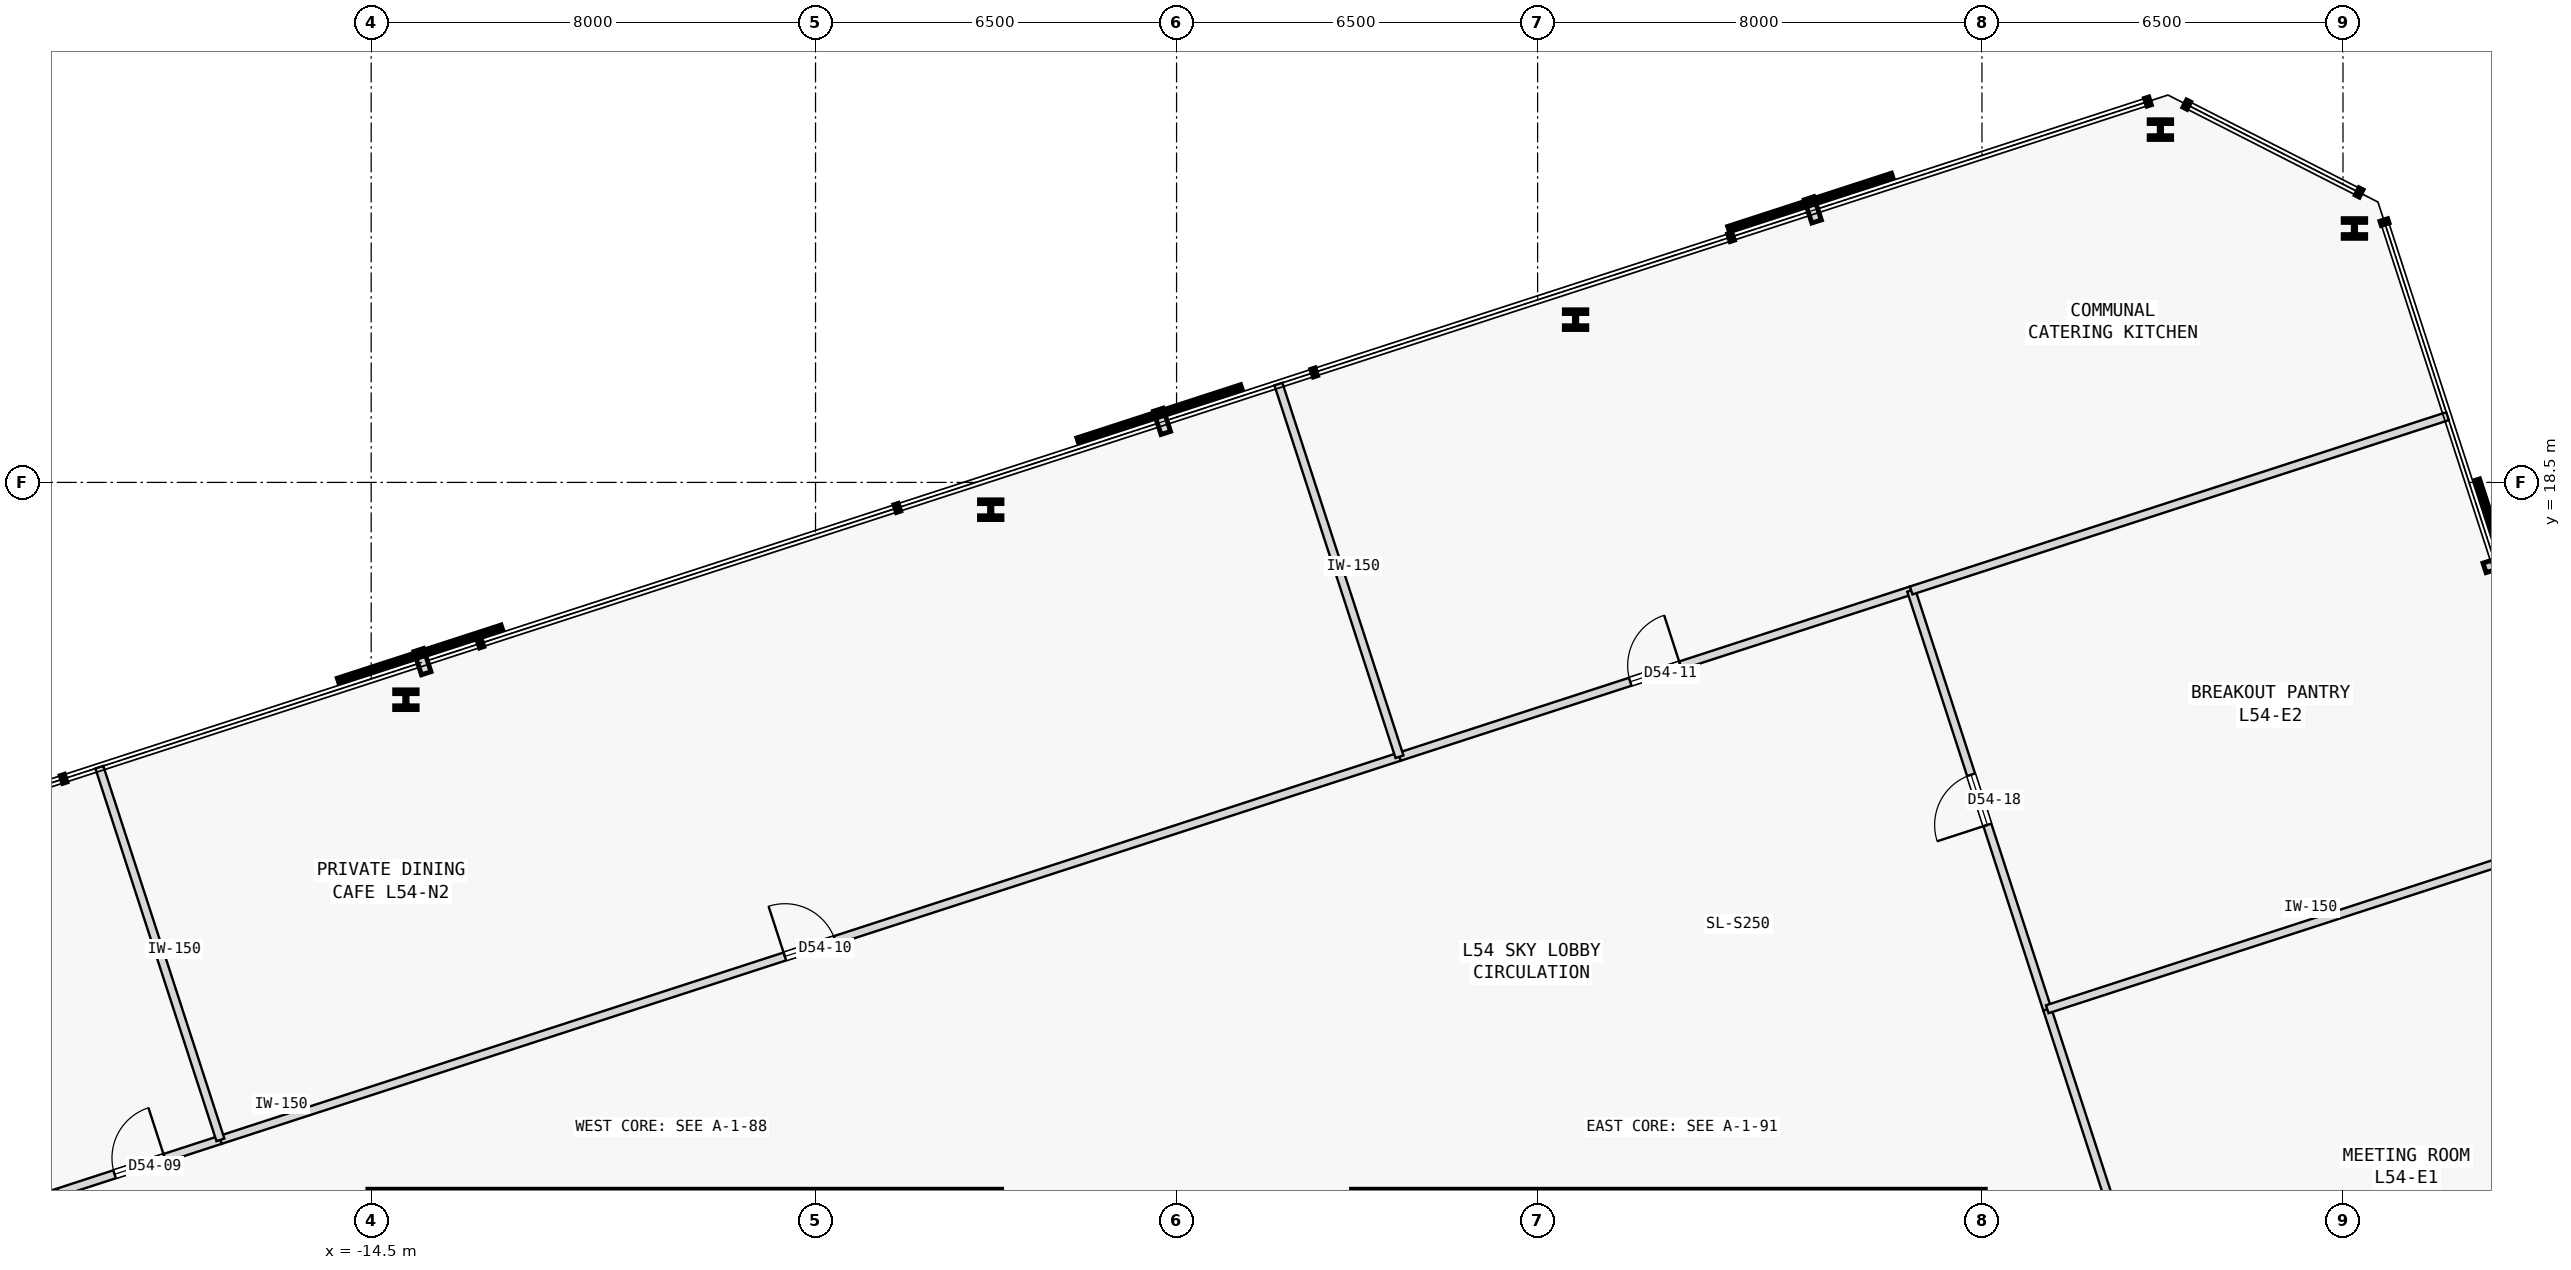
"""IFC4 building model, lengths in metres.
Left out: names, types, materials, properties, quantities, classifications, styles, units other than length and angle.
Written with IfcOpenShell. Run it as: python <this file> out.ifc"""

import sys

from ifc_helpers import new_model, si_unit, direction, frame, frame_2d, origin, origin_2d, place, context, subcontext, project, spatial, rectangle, i_section, extrude, element, fill, save


model = new_model("IFC4")
c1 = context("Model", 3, precision=1e-05, world=origin(), true_north=direction((0.0, 1.0)))
c2 = subcontext(c1, "Body", "Model", "MODEL_VIEW")
j1 = project(units=[si_unit("LENGTHUNIT", "METRE"), si_unit("PLANEANGLEUNIT", "RADIAN")], contexts=[c1])
p1 = place(None, origin())
s1 = spatial("IfcSite", under=j1, at=p1, CompositionType="ELEMENT")
p2 = place(p1, origin())
s2 = spatial("IfcBuilding", under=s1, at=p2, CompositionType="ELEMENT")
p3 = place(p2, frame((0.0, 0.0, 206.8)))
s3 = spatial("IfcBuildingStorey", under=s2, at=p3, CompositionType="ELEMENT", Elevation=206.8)
for number, where, z_axis, x_axis in (
    (1, (-14.56, 5.6, 0.0), (0.0, 0.0, 1.0), (1.0, 0.0, 0.0)),
    (2, (3.15, 5.6, 0.0), (0.0, 0.0, 1.0), (1.0, 0.0, 0.0)),
):
    element("IfcWall", number, at=place(p3, frame(where, z_axis=z_axis, x_axis=x_axis)), inside=s3, PredefinedType="SHEAR", context=c2, shape_type="SweptSolid", body=[
        extrude(rectangle(XDim=11.41, YDim=0.35, at=frame_2d((5.705, 0.0))), origin(), (0.0, 0.0, 1.0), 3.875),
    ])
for number, where, z_axis, x_axis in (
    (3, (21.206, 23.071, 0.0), (0.0, 0.0, 1.0), (1.0, 0.0, 0.0)),
    (4, (17.713, 24.851, 0.0), (0.0, 0.0, 1.0), (1.0, 0.0, 0.0)),
    (5, (7.184, 21.43, 0.0), (0.0, 0.0, 1.0), (1.0, 0.0, 0.0)),
    (6, (-3.346, 18.009, 0.0), (0.0, 0.0, 1.0), (1.0, 0.0, 0.0)),
    (7, (-13.875, 14.587, 0.0), (0.0, 0.0, 1.0), (1.0, 0.0, 0.0)),
):
    element("IfcColumn", number, at=place(p3, frame(where, z_axis=z_axis, x_axis=x_axis)), inside=s3, PredefinedType="COLUMN", context=c2, shape_type="SweptSolid", body=[
        extrude(i_section(OverallWidth=0.405, OverallDepth=0.355, WebThickness=0.042, FlangeThickness=0.068, FilletRadius=0.015, at=origin_2d()), origin(), (0.0, 0.0, 1.0), 4.1),
    ])
p4 = place(p3, frame((-20.123, 5.719, 0.0), z_axis=(0.0, 0.0, 1.0), x_axis=(0.95105108089, 0.309033722331, 0.0)))
e8 = element("IfcWall", 8, at=p4, inside=s3, PredefinedType="PARTITIONING", context=c2, shape_type="SweptSolid", body=[
    extrude(rectangle(XDim=3.058, YDim=0.15, at=frame_2d((1.529, 0.0))), origin(), (0.0, 0.0, 1.0), 3.875),
])
p5 = place(p4, frame((1.054, 0.0, 0.0)))
e9 = element("IfcOpeningElement", 9, at=p5, cuts=e8, PredefinedType="OPENING", context=c2, shape_type="SweptSolid", body=[
    extrude(rectangle(XDim=0.95, YDim=2.15, at=frame_2d((0.475, 1.075))), frame((0.0, 0.085, 0.0), z_axis=(0.0, -1.0, 0.0), x_axis=(1.0, 0.0, 0.0)), (0.0, 0.0, 1.0), 0.17),
])
p6 = place(p3, frame((-17.214, 6.664, 0.0), z_axis=(0.0, 0.0, 1.0), x_axis=(0.951056894815, 0.309015829409, 0.0)))
e10 = element("IfcWall", 10, at=p6, inside=s3, PredefinedType="PARTITIONING", context=c2, shape_type="SweptSolid", body=[
    extrude(rectangle(XDim=22.32, YDim=0.15, at=frame_2d((11.16, 0.0))), origin(), (0.0, 0.0, 1.0), 3.875),
])
p7 = place(p6, frame((10.685, 0.0, 0.0)))
e11 = element("IfcOpeningElement", 11, at=p7, cuts=e10, PredefinedType="OPENING", context=c2, shape_type="SweptSolid", body=[
    extrude(rectangle(XDim=0.95, YDim=2.15, at=frame_2d((0.475, 1.075))), frame((0.0, 0.085, 0.0), z_axis=(0.0, -1.0, 0.0), x_axis=(1.0, 0.0, 0.0)), (0.0, 0.0, 1.0), 0.17),
])
p8 = place(p3, frame((4.013, 13.561, 0.0), z_axis=(0.0, 0.0, 1.0), x_axis=(0.951057772929, 0.309013126826, 0.0)))
e12 = element("IfcWall", 12, at=p8, inside=s3, PredefinedType="PARTITIONING", context=c2, shape_type="SweptSolid", body=[
    extrude(rectangle(XDim=9.687, YDim=0.15, at=frame_2d((4.844, 0.0))), origin(), (0.0, 0.0, 1.0), 3.875),
])
p9 = place(p8, frame((4.368, 0.0, 0.0)))
e13 = element("IfcOpeningElement", 13, at=p9, cuts=e12, PredefinedType="OPENING", context=c2, shape_type="SweptSolid", body=[
    extrude(rectangle(XDim=0.95, YDim=2.15, at=frame_2d((0.475, 1.075))), frame((0.0, 0.085, 0.0), z_axis=(0.0, -1.0, 0.0), x_axis=(1.0, 0.0, 0.0)), (0.0, 0.0, 1.0), 0.17),
])
p10 = place(p3, frame((20.431, -5.618, 0.0), z_axis=(0.0, 0.0, 1.0), x_axis=(-0.309021492288, 0.951055054823, 0.0)))
e14 = element("IfcWall", 14, at=p10, inside=s3, PredefinedType="PARTITIONING", context=c2, shape_type="SweptSolid", body=[
    extrude(rectangle(XDim=15.387, YDim=0.15, at=frame_2d((7.693, 0.0))), origin(), (0.0, 0.0, 1.0), 3.875),
])
p11 = place(p10, frame((7.219, 0.0, 0.0)))
e15 = element("IfcOpeningElement", 15, at=p11, cuts=e14, PredefinedType="OPENING", context=c2, shape_type="SweptSolid", body=[
    extrude(rectangle(XDim=0.95, YDim=2.15, at=frame_2d((0.475, 1.075))), frame((0.0, 0.085, 0.0), z_axis=(0.0, -1.0, 0.0), x_axis=(1.0, 0.0, 0.0)), (0.0, 0.0, 1.0), 0.17),
])
p12 = place(p3, frame((15.676, 9.015, 0.0), z_axis=(0.0, 0.0, 1.0), x_axis=(-0.30903035975, 0.951052173518, 0.0)))
e16 = element("IfcWall", 16, at=p12, inside=s3, PredefinedType="PARTITIONING", context=c2, shape_type="SweptSolid", body=[
    extrude(rectangle(XDim=7.927, YDim=0.15, at=frame_2d((3.963, 0.0))), origin(), (0.0, 0.0, 1.0), 3.875),
])
p13 = place(p12, frame((3.489, 0.0, 0.0)))
e17 = element("IfcOpeningElement", 17, at=p13, cuts=e16, PredefinedType="OPENING", context=c2, shape_type="SweptSolid", body=[
    extrude(rectangle(XDim=0.95, YDim=2.15, at=frame_2d((0.475, 1.075))), frame((0.0, 0.085, 0.0), z_axis=(0.0, -1.0, 0.0), x_axis=(1.0, 0.0, 0.0)), (0.0, 0.0, 1.0), 0.17),
])
p14 = place(p3, frame((-17.214, 6.664, 0.0), z_axis=(0.0, 0.0, 1.0), x_axis=(-0.30900233296, 0.951061279953, 0.0)))
e18 = element("IfcWall", 18, at=p14, inside=s3, PredefinedType="PARTITIONING", context=c2, shape_type="SweptSolid", body=[
    extrude(rectangle(XDim=7.054, YDim=0.15, at=frame_2d((3.527, 0.0))), origin(), (0.0, 0.0, 1.0), 3.875),
])
p15 = place(p3, frame((-36.083, 0.533, 0.0), z_axis=(0.0, 0.0, 1.0), x_axis=(0.95105881752, 0.309009911842, 0.0)))
e19 = element("IfcWall", 19, at=p15, inside=s3, PredefinedType="PARTITIONING", context=c2, shape_type="SweptSolid", body=[
    extrude(rectangle(XDim=16.744, YDim=0.15, at=frame_2d((8.372, 0.0))), origin(), (0.0, 0.0, 1.0), 3.875),
])
p16 = place(p3, frame((4.013, 13.561, 0.0), z_axis=(0.0, 0.0, 1.0), x_axis=(-0.30900233296, 0.951061279953, 0.0)))
e20 = element("IfcWall", 20, at=p16, inside=s3, PredefinedType="PARTITIONING", context=c2, shape_type="SweptSolid", body=[
    extrude(rectangle(XDim=7.054, YDim=0.15, at=frame_2d((3.527, 0.0))), origin(), (0.0, 0.0, 1.0), 3.875),
])
for number, where, z_axis, x_axis in (
    (21, (13.226, 16.554, 0.0), (0.0, 0.0, 1.0), (0.951, 0.309, 0.0)),
    (22, (15.676, 9.015, 0.0), (0.0, 0.0, 1.0), (0.951, 0.309, 0.0)),
):
    element("IfcWall", number, at=place(p3, frame(where, z_axis=z_axis, x_axis=x_axis)), inside=s3, PredefinedType="PARTITIONING", context=c2, shape_type="SweptSolid", body=[
        extrude(rectangle(XDim=10.153, YDim=0.15, at=frame_2d((5.076, 0.0))), origin(), (0.0, 0.0, 1.0), 3.875),
    ])
p17 = place(p5, origin())
e23 = element("IfcDoor", 23, at=p17, inside=s3, OperationType="SINGLE_SWING_RIGHT", PredefinedType="DOOR", context=c2, shape_type="SweptSolid", body=[
    extrude(rectangle(XDim=0.95, YDim=2.15, at=frame_2d((0.475, 1.075))), frame((0.0, 0.025, 0.0), z_axis=(0.0, -1.0, 0.0), x_axis=(1.0, 0.0, 0.0)), (0.0, 0.0, 1.0), 0.05),
])
fill(e9, e23)
p18 = place(p7, origin())
e24 = element("IfcDoor", 24, at=p18, inside=s3, OperationType="SINGLE_SWING_LEFT", PredefinedType="DOOR", context=c2, shape_type="SweptSolid", body=[
    extrude(rectangle(XDim=0.95, YDim=2.15, at=frame_2d((0.475, 1.075))), frame((0.0, 0.025, 0.0), z_axis=(0.0, -1.0, 0.0), x_axis=(1.0, 0.0, 0.0)), (0.0, 0.0, 1.0), 0.05),
])
fill(e11, e24)
p19 = place(p9, origin())
e25 = element("IfcDoor", 25, at=p19, inside=s3, OperationType="SINGLE_SWING_RIGHT", PredefinedType="DOOR", context=c2, shape_type="SweptSolid", body=[
    extrude(rectangle(XDim=0.95, YDim=2.15, at=frame_2d((0.475, 1.075))), frame((0.0, 0.025, 0.0), z_axis=(0.0, -1.0, 0.0), x_axis=(1.0, 0.0, 0.0)), (0.0, 0.0, 1.0), 0.05),
])
fill(e13, e25)
p20 = place(p13, origin())
e26 = element("IfcDoor", 26, at=p20, inside=s3, OperationType="SINGLE_SWING_LEFT", PredefinedType="DOOR", context=c2, shape_type="SweptSolid", body=[
    extrude(rectangle(XDim=0.95, YDim=2.15, at=frame_2d((0.475, 1.075))), frame((0.0, 0.025, 0.0), z_axis=(0.0, -1.0, 0.0), x_axis=(1.0, 0.0, 0.0)), (0.0, 0.0, 1.0), 0.05),
])
fill(e17, e26)
save(model, sys.argv[1])
